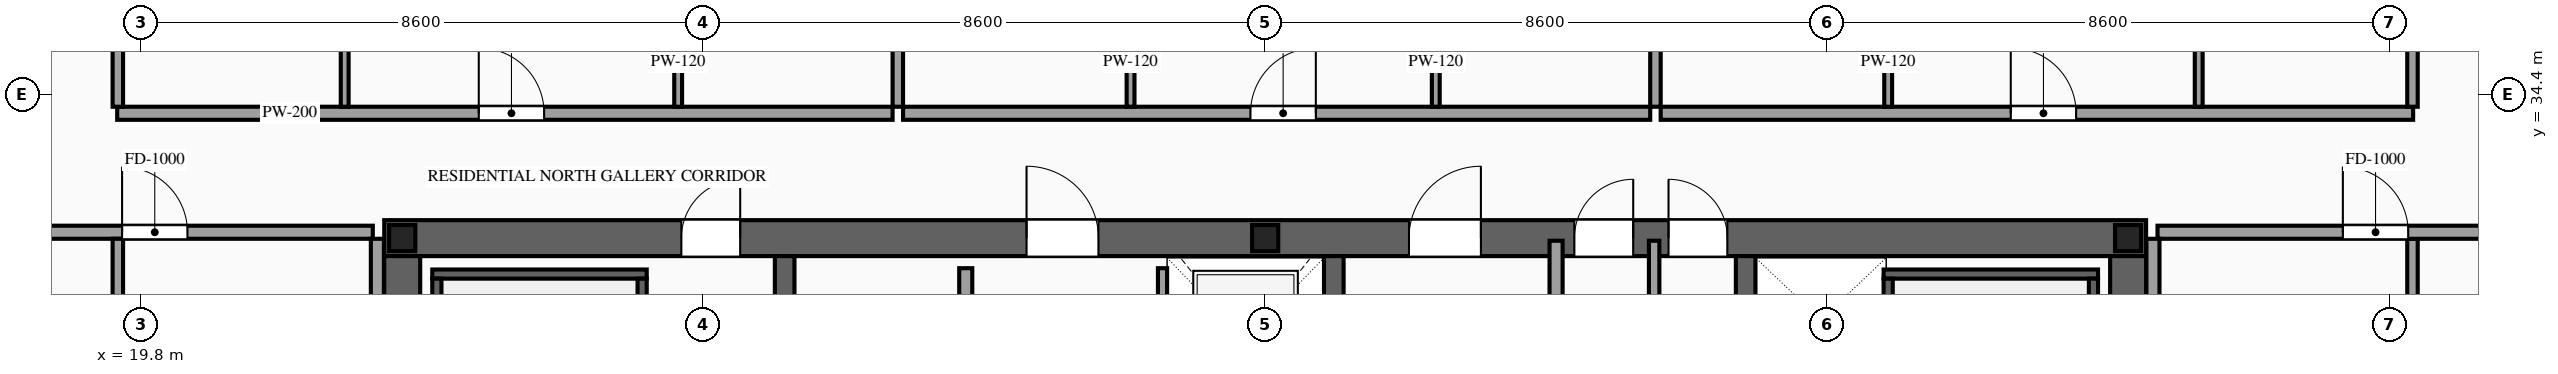
"""IFC4 building model, lengths in metres.
Left out: names, types, materials, properties, quantities, classifications, styles, units other than length and angle.
Written with IfcOpenShell. Run it as: python <this file> out.ifc"""

import sys

from ifc_helpers import new_model, si_unit, direction, frame, frame_2d, origin, origin_2d, place, context, subcontext, project, spatial, rectangle, i_section, extrude, source, transform, mapped, element, fill, save


model = new_model("IFC4")
c1 = context("Model", 3, precision=1e-05, world=origin(), true_north=direction((0.0, 1.0)))
c2 = subcontext(c1, "Body", "Model", "MODEL_VIEW")
j1 = project(units=[si_unit("LENGTHUNIT", "METRE"), si_unit("PLANEANGLEUNIT", "RADIAN")], contexts=[c1])
p1 = place(None, origin())
s1 = spatial("IfcSite", under=j1, at=p1, CompositionType="ELEMENT")
p2 = place(p1, origin())
s2 = spatial("IfcBuilding", under=s1, at=p2, CompositionType="ELEMENT")
p3 = place(p2, frame((0.0, 0.0, 238.1)))
s3 = spatial("IfcBuildingStorey", under=s2, at=p3, CompositionType="ELEMENT", Elevation=238.1)
p4 = place(p3, frame((23.525, 32.2, 0.0), z_axis=(0.0, 0.0, 1.0), x_axis=(1.0, 0.0, 0.0)))
e1 = element("IfcWall", 1, at=p4, inside=s3, PredefinedType="SHEAR", context=c2, shape_type="SweptSolid", body=[
    extrude(rectangle(XDim=26.95, YDim=0.55, at=frame_2d((13.475, 0.0))), origin(), (0.0, 0.0, 1.0), 3.5),
])
p5 = place(p4, frame((4.545, 0.0, 0.0)))
e2 = element("IfcOpeningElement", 2, at=p5, cuts=e1, PredefinedType="OPENING", context=c2, shape_type="SweptSolid", body=[
    extrude(rectangle(XDim=0.9, YDim=2.15, at=frame_2d((0.45, 1.075))), frame((0.0, 0.29, 0.0), z_axis=(0.0, -1.0, 0.0), x_axis=(1.0, 0.0, 0.0)), (0.0, 0.0, 1.0), 0.58),
])
p6 = place(p4, frame((9.825, 0.0, 0.0)))
e3 = element("IfcOpeningElement", 3, at=p6, cuts=e1, PredefinedType="OPENING", context=c2, shape_type="SweptSolid", body=[
    extrude(rectangle(XDim=1.1, YDim=2.2, at=frame_2d((0.55, 1.1))), frame((0.0, 0.29, 0.0), z_axis=(0.0, -1.0, 0.0), x_axis=(1.0, 0.0, 0.0)), (0.0, 0.0, 1.0), 0.58),
])
p7 = place(p4, frame((15.675, 0.0, 0.0)))
e4 = element("IfcOpeningElement", 4, at=p7, cuts=e1, PredefinedType="OPENING", context=c2, shape_type="SweptSolid", body=[
    extrude(rectangle(XDim=1.1, YDim=2.2, at=frame_2d((0.55, 1.1))), frame((0.0, 0.29, 0.0), z_axis=(0.0, -1.0, 0.0), x_axis=(1.0, 0.0, 0.0)), (0.0, 0.0, 1.0), 0.58),
])
p8 = place(p4, frame((18.205, 0.0, 0.0)))
e5 = element("IfcOpeningElement", 5, at=p8, cuts=e1, PredefinedType="OPENING", context=c2, shape_type="SweptSolid", body=[
    extrude(rectangle(XDim=0.9, YDim=2.15, at=frame_2d((0.45, 1.075))), frame((0.0, 0.29, 0.0), z_axis=(0.0, -1.0, 0.0), x_axis=(1.0, 0.0, 0.0)), (0.0, 0.0, 1.0), 0.58),
])
p9 = place(p4, frame((19.645, 0.0, 0.0)))
e6 = element("IfcOpeningElement", 6, at=p9, cuts=e1, PredefinedType="OPENING", context=c2, shape_type="SweptSolid", body=[
    extrude(rectangle(XDim=0.9, YDim=2.15, at=frame_2d((0.45, 1.075))), frame((0.0, 0.29, 0.0), z_axis=(0.0, -1.0, 0.0), x_axis=(1.0, 0.0, 0.0)), (0.0, 0.0, 1.0), 0.58),
])
m1 = source(origin(), c2, "Body", "SweptSolid", [
    extrude(rectangle(XDim=12.25, YDim=0.55, at=frame_2d((6.125, 0.0))), origin(), (0.0, 0.0, 1.0), 3.5),
])
for number, where, z_axis, x_axis in (
    (7, (23.8, 19.675, 0.0), (0.0, 0.0, 1.0), (0.0, 1.0, 0.0)),
    (8, (50.2, 19.675, 0.0), (0.0, 0.0, 1.0), (0.0, 1.0, 0.0)),
):
    element("IfcWall", number, at=place(p3, frame(where, z_axis=z_axis, x_axis=x_axis)), inside=s3, PredefinedType="SHEAR", context=c2, shape_type="MappedRepresentation", body=[
        mapped(m1, transform((0.0, 0.0, 0.0), scale=1.0)),
    ])
m2 = source(origin(), c2, "Body", "SweptSolid", [
    extrude(rectangle(XDim=12.25, YDim=0.3, at=frame_2d((6.125, 0.0))), origin(), (0.0, 0.0, 1.0), 3.5),
])
for number, where, z_axis, x_axis in (
    (9, (29.65, 19.675, 0.0), (0.0, 0.0, 1.0), (0.0, 1.0, 0.0)),
    (10, (38.05, 19.675, 0.0), (0.0, 0.0, 1.0), (0.0, 1.0, 0.0)),
    (11, (44.35, 19.675, 0.0), (0.0, 0.0, 1.0), (0.0, 1.0, 0.0)),
):
    element("IfcWall", number, at=place(p3, frame(where, z_axis=z_axis, x_axis=x_axis)), inside=s3, PredefinedType="SOLIDWALL", context=c2, shape_type="MappedRepresentation", body=[
        mapped(m2, transform((0.0, 0.0, 0.0), scale=1.0)),
    ])
m3 = source(origin(), c2, "Body", "SweptSolid", [
    extrude(i_section(OverallWidth=0.4, OverallDepth=0.4, WebThickness=0.013, FlangeThickness=0.021, at=origin_2d()), origin(), (0.0, 0.0, 1.0), 3.5),
])
for number, where, z_axis, x_axis in (
    (12, (23.8, 32.2, 0.0), (0.0, 0.0, 1.0), (1.0, 0.0, 0.0)),
    (13, (37.0, 32.2, 0.0), (0.0, 0.0, 1.0), (1.0, 0.0, 0.0)),
    (14, (50.2, 32.2, 0.0), (0.0, 0.0, 1.0), (1.0, 0.0, 0.0)),
):
    element("IfcColumn", number, at=place(p3, frame(where, z_axis=z_axis, x_axis=x_axis)), inside=s3, PredefinedType="COLUMN", context=c2, shape_type="MappedRepresentation", body=[
        mapped(m3, transform((0.0, 0.0, 0.0), scale=1.0)),
    ])
p10 = place(p3, frame((35.43, 29.4, 0.0), z_axis=(0.0, 0.0, 1.0), x_axis=(0.0, 1.0, 0.0)))
e15 = element("IfcWall", 15, at=p10, inside=s3, PredefinedType="SOLIDWALL", context=c2, shape_type="SweptSolid", body=[
    extrude(rectangle(XDim=2.34, YDim=0.14, at=frame_2d((1.17, 0.0))), origin(), (0.0, 0.0, 1.0), 3.28),
])
p11 = place(p10, frame((0.62, 0.0, 0.0)))
e16 = element("IfcOpeningElement", 16, at=p11, cuts=e15, PredefinedType="OPENING", context=c2, shape_type="SweptSolid", body=[
    extrude(rectangle(XDim=1.1, YDim=2.2, at=frame_2d((0.55, 1.1))), frame((0.0, 0.085, 0.0), z_axis=(0.0, -1.0, 0.0), x_axis=(1.0, 0.0, 0.0)), (0.0, 0.0, 1.0), 0.17),
])
m4 = source(origin(), c2, "Body", "SweptSolid", [
    extrude(rectangle(XDim=3.28, YDim=0.14, at=frame_2d((1.64, 0.0))), origin(), (0.0, 0.0, 1.0), 3.28),
])
p12 = place(p3, frame((24.26, 31.65, 0.0), z_axis=(0.0, 0.0, 1.0), x_axis=(1.0, 0.0, 0.0)))
e17 = element("IfcWall", 17, at=p12, inside=s3, PredefinedType="SOLIDWALL", context=c2, shape_type="MappedRepresentation", body=[
    mapped(m4, transform((0.0, 0.0, 0.0), scale=1.0)),
])
m5 = source(origin(), c2, "Body", "SweptSolid", [
    extrude(rectangle(XDim=8.94, YDim=0.14, at=frame_2d((4.47, 0.0))), origin(), (0.0, 0.0, 1.0), 3.28),
])
for number, where, z_axis, x_axis in (
    (18, (24.33, 22.64, 0.0), (0.0, 0.0, 1.0), (0.0, 1.0, 0.0)),
    (19, (27.47, 22.64, 0.0), (0.0, 0.0, 1.0), (0.0, 1.0, 0.0)),
):
    element("IfcWall", number, at=place(p3, frame(where, z_axis=z_axis, x_axis=x_axis)), inside=s3, PredefinedType="SOLIDWALL", context=c2, shape_type="MappedRepresentation", body=[
        mapped(m5, transform((0.0, 0.0, 0.0), scale=1.0)),
    ])
p13 = place(p3, frame((46.46, 31.65, 0.0), z_axis=(0.0, 0.0, 1.0), x_axis=(1.0, 0.0, 0.0)))
e20 = element("IfcWall", 20, at=p13, inside=s3, PredefinedType="SOLIDWALL", context=c2, shape_type="MappedRepresentation", body=[
    mapped(m4, transform((0.0, 0.0, 0.0), scale=1.0)),
])
for number, where, z_axis, x_axis in (
    (21, (46.53, 22.64, 0.0), (0.0, 0.0, 1.0), (0.0, 1.0, 0.0)),
    (22, (49.67, 22.64, 0.0), (0.0, 0.0, 1.0), (0.0, 1.0, 0.0)),
):
    element("IfcWall", number, at=place(p3, frame(where, z_axis=z_axis, x_axis=x_axis)), inside=s3, PredefinedType="SOLIDWALL", context=c2, shape_type="MappedRepresentation", body=[
        mapped(m5, transform((0.0, 0.0, 0.0), scale=1.0)),
    ])
p14 = place(p3, frame((32.42, 28.05, 0.0), z_axis=(0.0, 0.0, 1.0), x_axis=(0.0, 1.0, 0.0)))
e23 = element("IfcWall", 23, at=p14, inside=s3, PredefinedType="PARTITIONING", context=c2, shape_type="SweptSolid", body=[
    extrude(rectangle(XDim=3.69, YDim=0.2, at=frame_2d((1.845, 0.0))), origin(), (0.0, 0.0, 1.0), 3.28),
])
p15 = place(p14, frame((1.395, 0.0, 0.0)))
e24 = element("IfcOpeningElement", 24, at=p15, cuts=e23, PredefinedType="OPENING", context=c2, shape_type="SweptSolid", body=[
    extrude(rectangle(XDim=0.9, YDim=2.15, at=frame_2d((0.45, 1.075))), frame((0.0, 0.115, 0.0), z_axis=(0.0, -1.0, 0.0), x_axis=(1.0, 0.0, 0.0)), (0.0, 0.0, 1.0), 0.23),
])
m6 = source(origin(), c2, "Body", "SweptSolid", [
    extrude(rectangle(XDim=5.96, YDim=0.2, at=frame_2d((2.98, 0.0))), origin(), (0.0, 0.0, 1.0), 3.28),
])
p16 = place(p3, frame((41.45, 26.2, 0.0), z_axis=(0.0, 0.0, 1.0), x_axis=(0.0, 1.0, 0.0)))
e25 = element("IfcWall", 25, at=p16, inside=s3, PredefinedType="PARTITIONING", context=c2, shape_type="MappedRepresentation", body=[
    mapped(m6, transform((0.0, 0.0, 0.0), scale=1.0)),
])
m7 = source(origin(), c2, "Body", "SweptSolid", [
    extrude(rectangle(XDim=5.96, YDim=0.16, at=frame_2d((2.98, 0.0))), origin(), (0.0, 0.0, 1.0), 3.28),
])
p17 = place(p3, frame((42.95, 26.2, 0.0), z_axis=(0.0, 0.0, 1.0), x_axis=(0.0, 1.0, 0.0)))
e26 = element("IfcWall", 26, at=p17, inside=s3, PredefinedType="PARTITIONING", context=c2, shape_type="MappedRepresentation", body=[
    mapped(m7, transform((0.0, 0.0, 0.0), scale=1.0)),
])
p18 = place(p3, frame((19.44, 34.11, 0.0), z_axis=(0.0, 0.0, 1.0), x_axis=(1.0, 0.0, 0.0)))
e27 = element("IfcWall", 27, at=p18, inside=s3, PredefinedType="PARTITIONING", context=c2, shape_type="SweptSolid", body=[
    extrude(rectangle(XDim=11.861, YDim=0.2, at=frame_2d((5.931, 0.0))), origin(), (0.0, 0.0, 1.0), 3.28),
])
p19 = place(p18, frame((5.531, 0.0, 0.0)))
e28 = element("IfcOpeningElement", 28, at=p19, cuts=e27, PredefinedType="OPENING", context=c2, shape_type="SweptSolid", body=[
    extrude(rectangle(XDim=1.0, YDim=2.2, at=frame_2d((0.5, 1.1))), frame((0.0, 0.115, 0.0), z_axis=(0.0, -1.0, 0.0), x_axis=(1.0, 0.0, 0.0)), (0.0, 0.0, 1.0), 0.23),
])
m8 = source(origin(), c2, "Body", "SweptSolid", [
    extrude(rectangle(XDim=12.04, YDim=0.16, at=frame_2d((6.02, 0.0))), origin(), (0.0, 0.0, 1.0), 3.28),
])
p20 = place(p3, frame((31.381, 34.21, 0.0), z_axis=(0.0, 0.0, 1.0), x_axis=(0.0, 1.0, 0.0)))
e29 = element("IfcWall", 29, at=p20, inside=s3, PredefinedType="PARTITIONING", context=c2, shape_type="MappedRepresentation", body=[
    mapped(m8, transform((0.0, 0.0, 0.0), scale=1.0)),
])
p21 = place(p3, frame((22.92, 34.21, 0.0), z_axis=(0.0, 0.0, 1.0), x_axis=(0.0, 1.0, 0.0)))
e30 = element("IfcWall", 30, at=p21, inside=s3, PredefinedType="PARTITIONING", context=c2, shape_type="SweptSolid", body=[
    extrude(rectangle(XDim=4.11, YDim=0.12, at=frame_2d((2.055, 0.0))), origin(), (0.0, 0.0, 1.0), 3.28),
])
p22 = place(p21, frame((1.63, 0.0, 0.0)))
e31 = element("IfcOpeningElement", 31, at=p22, cuts=e30, PredefinedType="OPENING", context=c2, shape_type="SweptSolid", body=[
    extrude(rectangle(XDim=0.85, YDim=2.1, at=frame_2d((0.425, 1.05))), frame((0.0, 0.075, 0.0), z_axis=(0.0, -1.0, 0.0), x_axis=(1.0, 0.0, 0.0)), (0.0, 0.0, 1.0), 0.15),
])
p23 = place(p3, frame((28.021, 34.21, 0.0), z_axis=(0.0, 0.0, 1.0), x_axis=(0.0, 1.0, 0.0)))
e32 = element("IfcWall", 32, at=p23, inside=s3, PredefinedType="PARTITIONING", context=c2, shape_type="SweptSolid", body=[
    extrude(rectangle(XDim=4.11, YDim=0.12, at=frame_2d((2.055, 0.0))), origin(), (0.0, 0.0, 1.0), 3.28),
])
p24 = place(p23, frame((1.63, 0.0, 0.0)))
e33 = element("IfcOpeningElement", 33, at=p24, cuts=e32, PredefinedType="OPENING", context=c2, shape_type="SweptSolid", body=[
    extrude(rectangle(XDim=0.85, YDim=2.1, at=frame_2d((0.425, 1.05))), frame((0.0, 0.075, 0.0), z_axis=(0.0, -1.0, 0.0), x_axis=(1.0, 0.0, 0.0)), (0.0, 0.0, 1.0), 0.15),
])
p25 = place(p3, frame((31.461, 34.11, 0.0), z_axis=(0.0, 0.0, 1.0), x_axis=(1.0, 0.0, 0.0)))
e34 = element("IfcWall", 34, at=p25, inside=s3, PredefinedType="PARTITIONING", context=c2, shape_type="SweptSolid", body=[
    extrude(rectangle(XDim=11.429, YDim=0.2, at=frame_2d((5.714, 0.0))), origin(), (0.0, 0.0, 1.0), 3.28),
])
p26 = place(p25, frame((5.314, 0.0, 0.0)))
e35 = element("IfcOpeningElement", 35, at=p26, cuts=e34, PredefinedType="OPENING", context=c2, shape_type="SweptSolid", body=[
    extrude(rectangle(XDim=1.0, YDim=2.2, at=frame_2d((0.5, 1.1))), frame((0.0, 0.115, 0.0), z_axis=(0.0, -1.0, 0.0), x_axis=(1.0, 0.0, 0.0)), (0.0, 0.0, 1.0), 0.23),
])
p27 = place(p3, frame((42.97, 34.21, 0.0), z_axis=(0.0, 0.0, 1.0), x_axis=(0.0, 1.0, 0.0)))
e36 = element("IfcWall", 36, at=p27, inside=s3, PredefinedType="PARTITIONING", context=c2, shape_type="MappedRepresentation", body=[
    mapped(m8, transform((0.0, 0.0, 0.0), scale=1.0)),
])
p28 = place(p3, frame((34.941, 34.21, 0.0), z_axis=(0.0, 0.0, 1.0), x_axis=(0.0, 1.0, 0.0)))
e37 = element("IfcWall", 37, at=p28, inside=s3, PredefinedType="PARTITIONING", context=c2, shape_type="SweptSolid", body=[
    extrude(rectangle(XDim=4.11, YDim=0.12, at=frame_2d((2.055, 0.0))), origin(), (0.0, 0.0, 1.0), 3.28),
])
p29 = place(p28, frame((1.63, 0.0, 0.0)))
e38 = element("IfcOpeningElement", 38, at=p29, cuts=e37, PredefinedType="OPENING", context=c2, shape_type="SweptSolid", body=[
    extrude(rectangle(XDim=0.85, YDim=2.1, at=frame_2d((0.425, 1.05))), frame((0.0, 0.075, 0.0), z_axis=(0.0, -1.0, 0.0), x_axis=(1.0, 0.0, 0.0)), (0.0, 0.0, 1.0), 0.15),
])
p30 = place(p3, frame((39.61, 34.21, 0.0), z_axis=(0.0, 0.0, 1.0), x_axis=(0.0, 1.0, 0.0)))
e39 = element("IfcWall", 39, at=p30, inside=s3, PredefinedType="PARTITIONING", context=c2, shape_type="SweptSolid", body=[
    extrude(rectangle(XDim=4.11, YDim=0.12, at=frame_2d((2.055, 0.0))), origin(), (0.0, 0.0, 1.0), 3.28),
])
p31 = place(p30, frame((1.63, 0.0, 0.0)))
e40 = element("IfcOpeningElement", 40, at=p31, cuts=e39, PredefinedType="OPENING", context=c2, shape_type="SweptSolid", body=[
    extrude(rectangle(XDim=0.85, YDim=2.1, at=frame_2d((0.425, 1.05))), frame((0.0, 0.075, 0.0), z_axis=(0.0, -1.0, 0.0), x_axis=(1.0, 0.0, 0.0)), (0.0, 0.0, 1.0), 0.15),
])
p32 = place(p3, frame((43.05, 34.11, 0.0), z_axis=(0.0, 0.0, 1.0), x_axis=(1.0, 0.0, 0.0)))
e41 = element("IfcWall", 41, at=p32, inside=s3, PredefinedType="PARTITIONING", context=c2, shape_type="SweptSolid", body=[
    extrude(rectangle(XDim=11.51, YDim=0.2, at=frame_2d((5.755, 0.0))), origin(), (0.0, 0.0, 1.0), 3.28),
])
p33 = place(p32, frame((5.355, 0.0, 0.0)))
e42 = element("IfcOpeningElement", 42, at=p33, cuts=e41, PredefinedType="OPENING", context=c2, shape_type="SweptSolid", body=[
    extrude(rectangle(XDim=1.0, YDim=2.2, at=frame_2d((0.5, 1.1))), frame((0.0, 0.115, 0.0), z_axis=(0.0, -1.0, 0.0), x_axis=(1.0, 0.0, 0.0)), (0.0, 0.0, 1.0), 0.23),
])
m9 = source(origin(), c2, "Body", "SweptSolid", [
    extrude(rectangle(XDim=11.89, YDim=0.16, at=frame_2d((5.945, 0.0))), origin(), (0.0, 0.0, 1.0), 3.28),
])
for number, where, z_axis, x_axis in (
    (43, (19.45, 34.21, 0.0), (0.0, 0.0, 1.0), (0.0, 1.0, 0.0)),
    (44, (54.55, 34.21, 0.0), (0.0, 0.0, 1.0), (0.0, 1.0, 0.0)),
):
    element("IfcWall", number, at=place(p3, frame(where, z_axis=z_axis, x_axis=x_axis)), inside=s3, PredefinedType="PARTITIONING", context=c2, shape_type="MappedRepresentation", body=[
        mapped(m9, transform((0.0, 0.0, 0.0), scale=1.0)),
    ])
p34 = place(p3, frame((46.53, 34.21, 0.0), z_axis=(0.0, 0.0, 1.0), x_axis=(0.0, 1.0, 0.0)))
e45 = element("IfcWall", 45, at=p34, inside=s3, PredefinedType="PARTITIONING", context=c2, shape_type="SweptSolid", body=[
    extrude(rectangle(XDim=4.11, YDim=0.12, at=frame_2d((2.055, 0.0))), origin(), (0.0, 0.0, 1.0), 3.28),
])
p35 = place(p34, frame((1.63, 0.0, 0.0)))
e46 = element("IfcOpeningElement", 46, at=p35, cuts=e45, PredefinedType="OPENING", context=c2, shape_type="SweptSolid", body=[
    extrude(rectangle(XDim=0.85, YDim=2.1, at=frame_2d((0.425, 1.05))), frame((0.0, 0.075, 0.0), z_axis=(0.0, -1.0, 0.0), x_axis=(1.0, 0.0, 0.0)), (0.0, 0.0, 1.0), 0.15),
])
p36 = place(p3, frame((51.28, 34.21, 0.0), z_axis=(0.0, 0.0, 1.0), x_axis=(0.0, 1.0, 0.0)))
e47 = element("IfcWall", 47, at=p36, inside=s3, PredefinedType="PARTITIONING", context=c2, shape_type="SweptSolid", body=[
    extrude(rectangle(XDim=4.11, YDim=0.12, at=frame_2d((2.055, 0.0))), origin(), (0.0, 0.0, 1.0), 3.28),
])
p37 = place(p36, frame((1.63, 0.0, 0.0)))
e48 = element("IfcOpeningElement", 48, at=p37, cuts=e47, PredefinedType="OPENING", context=c2, shape_type="SweptSolid", body=[
    extrude(rectangle(XDim=0.85, YDim=2.1, at=frame_2d((0.425, 1.05))), frame((0.0, 0.075, 0.0), z_axis=(0.0, -1.0, 0.0), x_axis=(1.0, 0.0, 0.0)), (0.0, 0.0, 1.0), 0.15),
])
p38 = place(p3, frame((16.55, 32.29, 0.0), z_axis=(0.0, 0.0, 1.0), x_axis=(1.0, 0.0, 0.0)))
e49 = element("IfcWall", 49, at=p38, inside=s3, PredefinedType="PARTITIONING", context=c2, shape_type="SweptSolid", body=[
    extrude(rectangle(XDim=6.8, YDim=0.2, at=frame_2d((3.4, 0.0))), origin(), (0.0, 0.0, 1.0), 2.825),
])
p39 = place(p38, frame((2.965, 0.0, 0.0)))
e50 = element("IfcOpeningElement", 50, at=p39, cuts=e49, PredefinedType="OPENING", context=c2, shape_type="SweptSolid", body=[
    extrude(rectangle(XDim=1.0, YDim=2.2, at=frame_2d((0.5, 1.1))), frame((0.0, 0.115, 0.0), z_axis=(0.0, -1.0, 0.0), x_axis=(1.0, 0.0, 0.0)), (0.0, 0.0, 1.0), 0.23),
])
m10 = source(origin(), c2, "Body", "SweptSolid", [
    extrude(rectangle(XDim=26.69, YDim=0.16, at=frame_2d((13.345, 0.0))), origin(), (0.0, 0.0, 1.0), 3.28),
])
for number, where, z_axis, x_axis in (
    (51, (19.45, 5.5, 0.0), (0.0, 0.0, 1.0), (0.0, 1.0, 0.0)),
    (52, (54.55, 5.5, 0.0), (0.0, 0.0, 1.0), (0.0, 1.0, 0.0)),
):
    element("IfcWall", number, at=place(p3, frame(where, z_axis=z_axis, x_axis=x_axis)), inside=s3, PredefinedType="PARTITIONING", context=c2, shape_type="MappedRepresentation", body=[
        mapped(m10, transform((0.0, 0.0, 0.0), scale=1.0)),
    ])
m11 = source(origin(), c2, "Body", "SweptSolid", [
    extrude(rectangle(XDim=6.29, YDim=0.2, at=frame_2d((3.145, 0.0))), origin(), (0.0, 0.0, 1.0), 3.28),
])
p40 = place(p3, frame((23.42, 25.9, 0.0), z_axis=(0.0, 0.0, 1.0), x_axis=(0.0, 1.0, 0.0)))
e53 = element("IfcWall", 53, at=p40, inside=s3, PredefinedType="PARTITIONING", context=c2, shape_type="MappedRepresentation", body=[
    mapped(m11, transform((0.0, 0.0, 0.0), scale=1.0)),
])
p41 = place(p3, frame((50.65, 32.29, 0.0), z_axis=(0.0, 0.0, 1.0), x_axis=(1.0, 0.0, 0.0)))
e54 = element("IfcWall", 54, at=p41, inside=s3, PredefinedType="PARTITIONING", context=c2, shape_type="SweptSolid", body=[
    extrude(rectangle(XDim=6.8, YDim=0.2, at=frame_2d((3.4, 0.0))), origin(), (0.0, 0.0, 1.0), 2.825),
])
p42 = place(p41, frame((2.835, 0.0, 0.0)))
e55 = element("IfcOpeningElement", 55, at=p42, cuts=e54, PredefinedType="OPENING", context=c2, shape_type="SweptSolid", body=[
    extrude(rectangle(XDim=1.0, YDim=2.2, at=frame_2d((0.5, 1.1))), frame((0.0, 0.115, 0.0), z_axis=(0.0, -1.0, 0.0), x_axis=(1.0, 0.0, 0.0)), (0.0, 0.0, 1.0), 0.23),
])
p43 = place(p3, frame((50.58, 25.9, 0.0), z_axis=(0.0, 0.0, 1.0), x_axis=(0.0, 1.0, 0.0)))
e56 = element("IfcWall", 56, at=p43, inside=s3, PredefinedType="PARTITIONING", context=c2, shape_type="MappedRepresentation", body=[
    mapped(m11, transform((0.0, 0.0, 0.0), scale=1.0)),
])
m12 = source(origin(), c2, "Body", "SweptSolid", [
    extrude(rectangle(XDim=0.9, YDim=2.15, at=frame_2d((0.45, 1.075))), frame((0.0, 0.025, 0.0), z_axis=(0.0, -1.0, 0.0), x_axis=(1.0, 0.0, 0.0)), (0.0, 0.0, 1.0), 0.05),
])
p44 = place(p5, origin())
e57 = element("IfcDoor", 57, at=p44, inside=s3, OperationType="SINGLE_SWING_RIGHT", PredefinedType="DOOR", context=c2, shape_type="MappedRepresentation", body=[
    mapped(m12, transform((0.0, 0.0, 0.0), scale=1.0)),
])
fill(e2, e57)
m13 = source(origin(), c2, "Body", "SweptSolid", [
    extrude(rectangle(XDim=1.1, YDim=2.2, at=frame_2d((0.55, 1.1))), frame((0.0, 0.025, 0.0), z_axis=(0.0, -1.0, 0.0), x_axis=(1.0, 0.0, 0.0)), (0.0, 0.0, 1.0), 0.05),
])
p45 = place(p6, origin())
e58 = element("IfcDoor", 58, at=p45, inside=s3, OperationType="SINGLE_SWING_LEFT", PredefinedType="DOOR", context=c2, shape_type="MappedRepresentation", body=[
    mapped(m13, transform((0.0, 0.0, 0.0), scale=1.0)),
])
fill(e3, e58)
p46 = place(p7, origin())
e59 = element("IfcDoor", 59, at=p46, inside=s3, OperationType="SINGLE_SWING_RIGHT", PredefinedType="DOOR", context=c2, shape_type="MappedRepresentation", body=[
    mapped(m13, transform((0.0, 0.0, 0.0), scale=1.0)),
])
fill(e4, e59)
p47 = place(p8, origin())
e60 = element("IfcDoor", 60, at=p47, inside=s3, OperationType="SINGLE_SWING_RIGHT", PredefinedType="DOOR", context=c2, shape_type="MappedRepresentation", body=[
    mapped(m12, transform((0.0, 0.0, 0.0), scale=1.0)),
])
fill(e5, e60)
p48 = place(p9, origin())
e61 = element("IfcDoor", 61, at=p48, inside=s3, OperationType="SINGLE_SWING_LEFT", PredefinedType="DOOR", context=c2, shape_type="MappedRepresentation", body=[
    mapped(m12, transform((0.0, 0.0, 0.0), scale=1.0)),
])
fill(e6, e61)
m14 = source(origin(), c2, "Body", "SweptSolid", [
    extrude(rectangle(XDim=1.0, YDim=2.2, at=frame_2d((0.5, 1.1))), frame((0.0, 0.025, 0.0), z_axis=(0.0, -1.0, 0.0), x_axis=(1.0, 0.0, 0.0)), (0.0, 0.0, 1.0), 0.05),
])
p49 = place(p19, origin())
e62 = element("IfcDoor", 62, at=p49, inside=s3, OperationType="SINGLE_SWING_LEFT", PredefinedType="DOOR", context=c2, shape_type="MappedRepresentation", body=[
    mapped(m14, transform((0.0, 0.0, 0.0), scale=1.0)),
])
fill(e28, e62)
p50 = place(p26, origin())
e63 = element("IfcDoor", 63, at=p50, inside=s3, OperationType="SINGLE_SWING_RIGHT", PredefinedType="DOOR", context=c2, shape_type="MappedRepresentation", body=[
    mapped(m14, transform((0.0, 0.0, 0.0), scale=1.0)),
])
fill(e35, e63)
p51 = place(p33, origin())
e64 = element("IfcDoor", 64, at=p51, inside=s3, OperationType="SINGLE_SWING_LEFT", PredefinedType="DOOR", context=c2, shape_type="MappedRepresentation", body=[
    mapped(m14, transform((0.0, 0.0, 0.0), scale=1.0)),
])
fill(e42, e64)
p52 = place(p39, origin())
e65 = element("IfcDoor", 65, at=p52, inside=s3, OperationType="SINGLE_SWING_LEFT", PredefinedType="DOOR", context=c2, shape_type="MappedRepresentation", body=[
    mapped(m14, transform((0.0, 0.0, 0.0), scale=1.0)),
])
fill(e50, e65)
p53 = place(p42, origin())
e66 = element("IfcDoor", 66, at=p53, inside=s3, OperationType="SINGLE_SWING_LEFT", PredefinedType="DOOR", context=c2, shape_type="MappedRepresentation", body=[
    mapped(m14, transform((0.0, 0.0, 0.0), scale=1.0)),
])
fill(e55, e66)
save(model, sys.argv[1])
